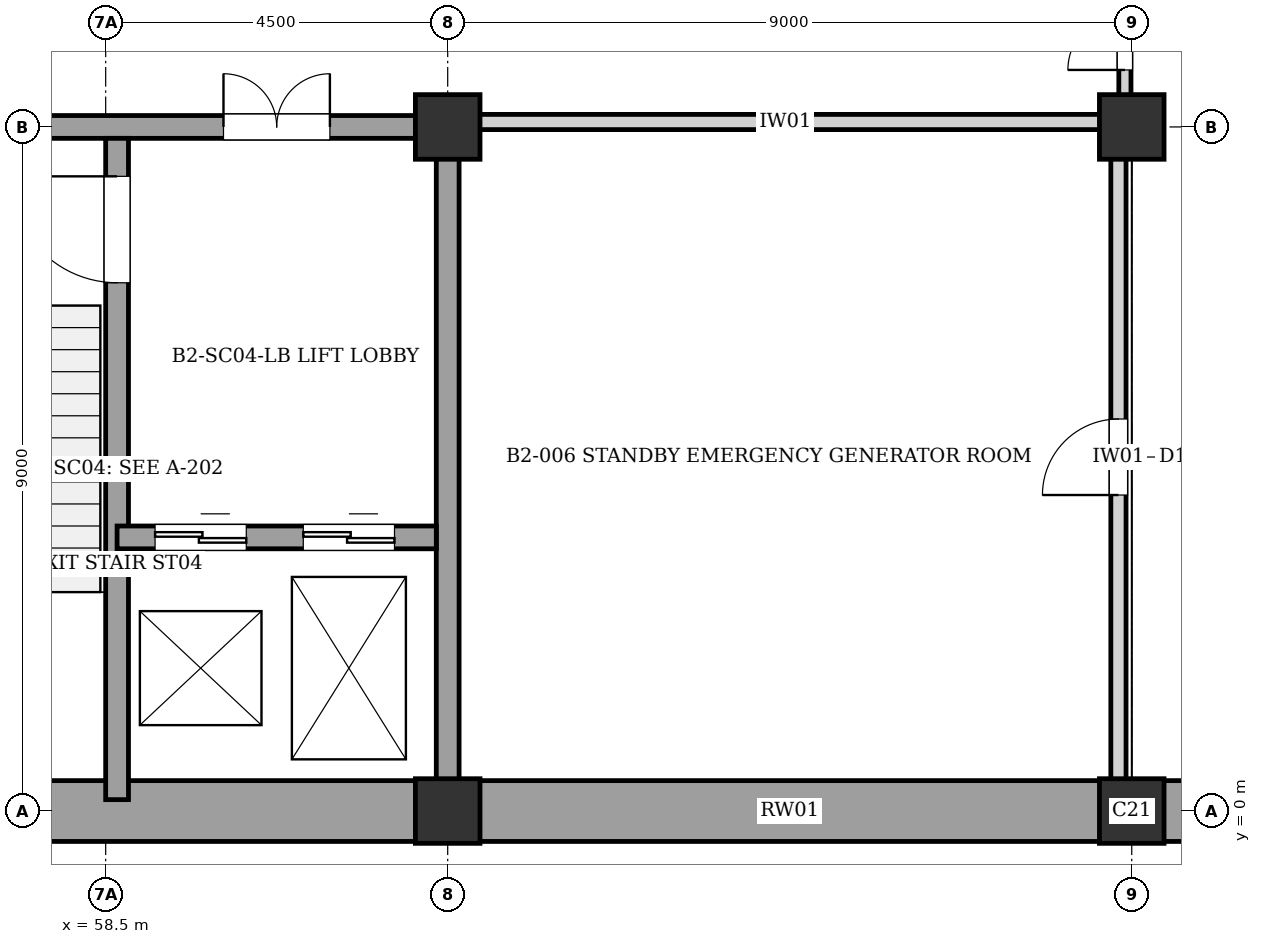
"""IFC4 building model, lengths in metres.
Left out: names, types, materials, properties, quantities, classifications, styles, units other than length and angle.
Written with IfcOpenShell. Run it as: python <this file> out.ifc"""

import sys

from ifc_helpers import new_model, si_unit, direction, frame, frame_2d, origin, origin_2d, place, context, subcontext, project, spatial, rectangle, extrude, element, fill, save


model = new_model("IFC4")
c1 = context("Model", 3, precision=1e-05, world=origin(), true_north=direction((0.0, 1.0)))
c2 = subcontext(c1, "Body", "Model", "MODEL_VIEW")
j1 = project(units=[si_unit("LENGTHUNIT", "METRE"), si_unit("PLANEANGLEUNIT", "RADIAN")], contexts=[c1])
p1 = place(None, origin())
s1 = spatial("IfcSite", under=j1, at=p1, CompositionType="ELEMENT")
p2 = place(p1, origin())
s2 = spatial("IfcBuilding", under=s1, at=p2, CompositionType="ELEMENT")
p3 = place(p2, frame((0.0, 0.0, -8.96)))
s3 = spatial("IfcBuildingStorey", under=s2, at=p3, CompositionType="ELEMENT", Elevation=-8.96)
for number, where, z_axis, x_axis in (
    (1, (63.0, 0.0, 0.0), (0.0, 0.0, 1.0), (1.0, 0.0, 0.0)),
    (2, (63.0, 9.0, 0.0), (0.0, 0.0, 1.0), (1.0, 0.0, 0.0)),
    (3, (72.0, 0.0, 0.0), (0.0, 0.0, 1.0), (1.0, 0.0, 0.0)),
    (4, (72.0, 9.0, 0.0), (0.0, 0.0, 1.0), (1.0, 0.0, 0.0)),
):
    element("IfcColumn", number, at=place(p3, frame(where, z_axis=z_axis, x_axis=x_axis)), inside=s3, PredefinedType="COLUMN", context=c2, shape_type="SweptSolid", body=[
        extrude(rectangle(XDim=0.85, YDim=0.85, at=origin_2d()), origin(), (0.0, 0.0, 1.0), 4.48),
    ])
for number, where, z_axis, x_axis in (
    (5, (72.0, 0.0, 0.0), (0.0, 0.0, 1.0), (-1.0, 0.0, 0.0)),
    (6, (63.0, 0.0, 0.0), (0.0, 0.0, 1.0), (-1.0, 0.0, 0.0)),
):
    element("IfcWall", number, at=place(p3, frame(where, z_axis=z_axis, x_axis=x_axis)), inside=s3, PredefinedType="USERDEFINED", context=c2, shape_type="SweptSolid", body=[
        extrude(rectangle(XDim=9.0, YDim=0.8, at=frame_2d((4.5, 0.0))), origin(), (0.0, 0.0, 1.0), 4.2),
    ])
p4 = place(p3, frame((81.0, 0.0, 0.0), z_axis=(0.0, 0.0, 1.0), x_axis=(-1.0, 0.0, 0.0)))
e7 = element("IfcWall", 7, at=p4, inside=s3, PredefinedType="USERDEFINED", context=c2, shape_type="SweptSolid", body=[
    extrude(rectangle(XDim=9.0, YDim=0.8, at=frame_2d((4.5, 0.0))), origin(), (0.0, 0.0, 1.0), 4.03),
])
p5 = place(p3, frame((63.0, 0.0, 0.0), z_axis=(0.0, 0.0, 1.0), x_axis=(0.0, 1.0, 0.0)))
e8 = element("IfcWall", 8, at=p5, inside=s3, PredefinedType="SHEAR", context=c2, shape_type="SweptSolid", body=[
    extrude(rectangle(XDim=9.0, YDim=0.3, at=frame_2d((4.5, 0.0))), origin(), (0.0, 0.0, 1.0), 4.2),
])
p6 = place(p3, frame((54.0, 9.0, 0.0), z_axis=(0.0, 0.0, 1.0), x_axis=(1.0, 0.0, 0.0)))
e9 = element("IfcWall", 9, at=p6, inside=s3, PredefinedType="SHEAR", context=c2, shape_type="SweptSolid", body=[
    extrude(rectangle(XDim=9.0, YDim=0.3, at=frame_2d((4.5, 0.0))), origin(), (0.0, 0.0, 1.0), 4.2),
])
p7 = place(p6, frame((6.05, 0.0, 0.0)))
e10 = element("IfcOpeningElement", 10, at=p7, cuts=e9, PredefinedType="OPENING", context=c2, shape_type="SweptSolid", body=[
    extrude(rectangle(XDim=1.4, YDim=2.02, at=frame_2d((0.7, 1.01))), frame((0.0, 0.16, 0.0), z_axis=(0.0, -1.0, 0.0), x_axis=(1.0, 0.0, 0.0)), (0.0, 0.0, 1.0), 0.32),
])
p8 = place(p3, frame((58.65, 0.15, 0.0), z_axis=(0.0, 0.0, 1.0), x_axis=(0.0, 1.0, 0.0)))
e11 = element("IfcWall", 11, at=p8, inside=s3, PredefinedType="SHEAR", context=c2, shape_type="SweptSolid", body=[
    extrude(rectangle(XDim=8.7, YDim=0.3, at=frame_2d((4.35, 0.0))), origin(), (0.0, 0.0, 1.0), 4.2),
])
p9 = place(p8, frame((6.8, 0.0, 0.0)))
e12 = element("IfcOpeningElement", 12, at=p9, cuts=e11, PredefinedType="OPENING", context=c2, shape_type="SweptSolid", body=[
    extrude(rectangle(XDim=1.4, YDim=2.02, at=frame_2d((0.7, 1.01))), frame((0.0, 0.16, 0.0), z_axis=(0.0, -1.0, 0.0), x_axis=(1.0, 0.0, 0.0)), (0.0, 0.0, 1.0), 0.32),
])
p10 = place(p3, frame((58.65, 3.6, 0.0), z_axis=(0.0, 0.0, 1.0), x_axis=(1.0, 0.0, 0.0)))
e13 = element("IfcWall", 13, at=p10, inside=s3, PredefinedType="SHEAR", context=c2, shape_type="SweptSolid", body=[
    extrude(rectangle(XDim=4.2, YDim=0.3, at=frame_2d((2.1, 0.0))), origin(), (0.0, 0.0, 1.0), 4.2),
])
p11 = place(p10, frame((0.5, 0.0, 0.0)))
e14 = element("IfcOpeningElement", 14, at=p11, cuts=e13, PredefinedType="OPENING", context=c2, shape_type="SweptSolid", body=[
    extrude(rectangle(XDim=1.2, YDim=2.2, at=frame_2d((0.6, 1.1))), frame((0.0, 0.16, 0.0), z_axis=(0.0, -1.0, 0.0), x_axis=(1.0, 0.0, 0.0)), (0.0, 0.0, 1.0), 0.32),
])
p12 = place(p10, frame((2.45, 0.0, 0.0)))
e15 = element("IfcOpeningElement", 15, at=p12, cuts=e13, PredefinedType="OPENING", context=c2, shape_type="SweptSolid", body=[
    extrude(rectangle(XDim=1.2, YDim=2.2, at=frame_2d((0.6, 1.1))), frame((0.0, 0.16, 0.0), z_axis=(0.0, -1.0, 0.0), x_axis=(1.0, 0.0, 0.0)), (0.0, 0.0, 1.0), 0.32),
])
p13 = place(p3, frame((63.155, 9.065, 0.0), z_axis=(0.0, 0.0, 1.0), x_axis=(1.0, 0.0, 0.0)))
e16 = element("IfcWall", 16, at=p13, inside=s3, PredefinedType="PARTITIONING", context=c2, shape_type="SweptSolid", body=[
    extrude(rectangle(XDim=8.575, YDim=0.2, at=frame_2d((4.288, 0.0))), origin(), (0.0, 0.0, 1.0), 3.3),
])
p14 = place(p3, frame((71.91, 9.22, 0.0), z_axis=(0.0, 0.0, 1.0), x_axis=(0.0, 1.0, 0.0)))
e17 = element("IfcWall", 17, at=p14, inside=s3, PredefinedType="PARTITIONING", context=c2, shape_type="SweptSolid", body=[
    extrude(rectangle(XDim=2.56, YDim=0.16, at=frame_2d((1.28, 0.0))), origin(), (0.0, 0.0, 1.0), 3.3),
])
p15 = place(p14, frame((0.53, 0.0, 0.0)))
e18 = element("IfcOpeningElement", 18, at=p15, cuts=e17, PredefinedType="OPENING", context=c2, shape_type="SweptSolid", body=[
    extrude(rectangle(XDim=1.5, YDim=2.1, at=frame_2d((0.75, 1.05))), frame((0.0, 0.09, 0.0), z_axis=(0.0, -1.0, 0.0), x_axis=(1.0, 0.0, 0.0)), (0.0, 0.0, 1.0), 0.18),
])
p16 = place(p3, frame((71.825, 0.405, 0.0), z_axis=(0.0, 0.0, 1.0), x_axis=(0.0, 1.0, 0.0)))
e19 = element("IfcWall", 19, at=p16, inside=s3, PredefinedType="PARTITIONING", context=c2, shape_type="SweptSolid", body=[
    extrude(rectangle(XDim=8.505, YDim=0.2, at=frame_2d((4.252, 0.0))), origin(), (0.0, 0.0, 1.0), 3.3),
])
p17 = place(p16, frame((3.752, 0.0, 0.0)))
e20 = element("IfcOpeningElement", 20, at=p17, cuts=e19, PredefinedType="OPENING", context=c2, shape_type="SweptSolid", body=[
    extrude(rectangle(XDim=1.0, YDim=2.1, at=frame_2d((0.5, 1.05))), frame((0.0, 0.11, 0.0), z_axis=(0.0, -1.0, 0.0), x_axis=(1.0, 0.0, 0.0)), (0.0, 0.0, 1.0), 0.22),
])
p18 = place(p7, origin())
e21 = element("IfcDoor", 21, at=p18, inside=s3, OperationType="DOUBLE_DOOR_SINGLE_SWING", PredefinedType="DOOR", context=c2, shape_type="SweptSolid", body=[
    extrude(rectangle(XDim=1.4, YDim=2.02, at=frame_2d((0.7, 1.01))), frame((0.0, 0.025, 0.0), z_axis=(0.0, -1.0, 0.0), x_axis=(1.0, 0.0, 0.0)), (0.0, 0.0, 1.0), 0.05),
])
fill(e10, e21)
p19 = place(p9, origin())
e22 = element("IfcDoor", 22, at=p19, inside=s3, OperationType="SINGLE_SWING_RIGHT", PredefinedType="DOOR", context=c2, shape_type="SweptSolid", body=[
    extrude(rectangle(XDim=1.4, YDim=2.02, at=frame_2d((0.7, 1.01))), frame((0.0, 0.025, 0.0), z_axis=(0.0, -1.0, 0.0), x_axis=(1.0, 0.0, 0.0)), (0.0, 0.0, 1.0), 0.05),
])
fill(e12, e22)
p20 = place(p11, origin())
e23 = element("IfcDoor", 23, at=p20, inside=s3, OperationType="DOUBLE_DOOR_SLIDING", PredefinedType="DOOR", context=c2, shape_type="SweptSolid", body=[
    extrude(rectangle(XDim=1.2, YDim=2.2, at=frame_2d((0.6, 1.1))), frame((0.0, 0.025, 0.0), z_axis=(0.0, -1.0, 0.0), x_axis=(1.0, 0.0, 0.0)), (0.0, 0.0, 1.0), 0.05),
])
fill(e14, e23)
p21 = place(p12, origin())
e24 = element("IfcDoor", 24, at=p21, inside=s3, OperationType="DOUBLE_DOOR_SLIDING", PredefinedType="DOOR", context=c2, shape_type="SweptSolid", body=[
    extrude(rectangle(XDim=1.2, YDim=2.2, at=frame_2d((0.6, 1.1))), frame((0.0, 0.025, 0.0), z_axis=(0.0, -1.0, 0.0), x_axis=(1.0, 0.0, 0.0)), (0.0, 0.0, 1.0), 0.05),
])
fill(e15, e24)
p22 = place(p15, origin())
e25 = element("IfcDoor", 25, at=p22, inside=s3, OperationType="DOUBLE_DOOR_SINGLE_SWING", PredefinedType="DOOR", context=c2, shape_type="SweptSolid", body=[
    extrude(rectangle(XDim=1.5, YDim=2.1, at=frame_2d((0.75, 1.05))), frame((0.0, 0.025, 0.0), z_axis=(0.0, -1.0, 0.0), x_axis=(1.0, 0.0, 0.0)), (0.0, 0.0, 1.0), 0.05),
])
fill(e18, e25)
p23 = place(p17, origin())
e26 = element("IfcDoor", 26, at=p23, inside=s3, OperationType="SINGLE_SWING_LEFT", PredefinedType="DOOR", context=c2, shape_type="SweptSolid", body=[
    extrude(rectangle(XDim=1.0, YDim=2.1, at=frame_2d((0.5, 1.05))), frame((0.0, 0.025, 0.0), z_axis=(0.0, -1.0, 0.0), x_axis=(1.0, 0.0, 0.0)), (0.0, 0.0, 1.0), 0.05),
])
fill(e20, e26)
save(model, sys.argv[1])
